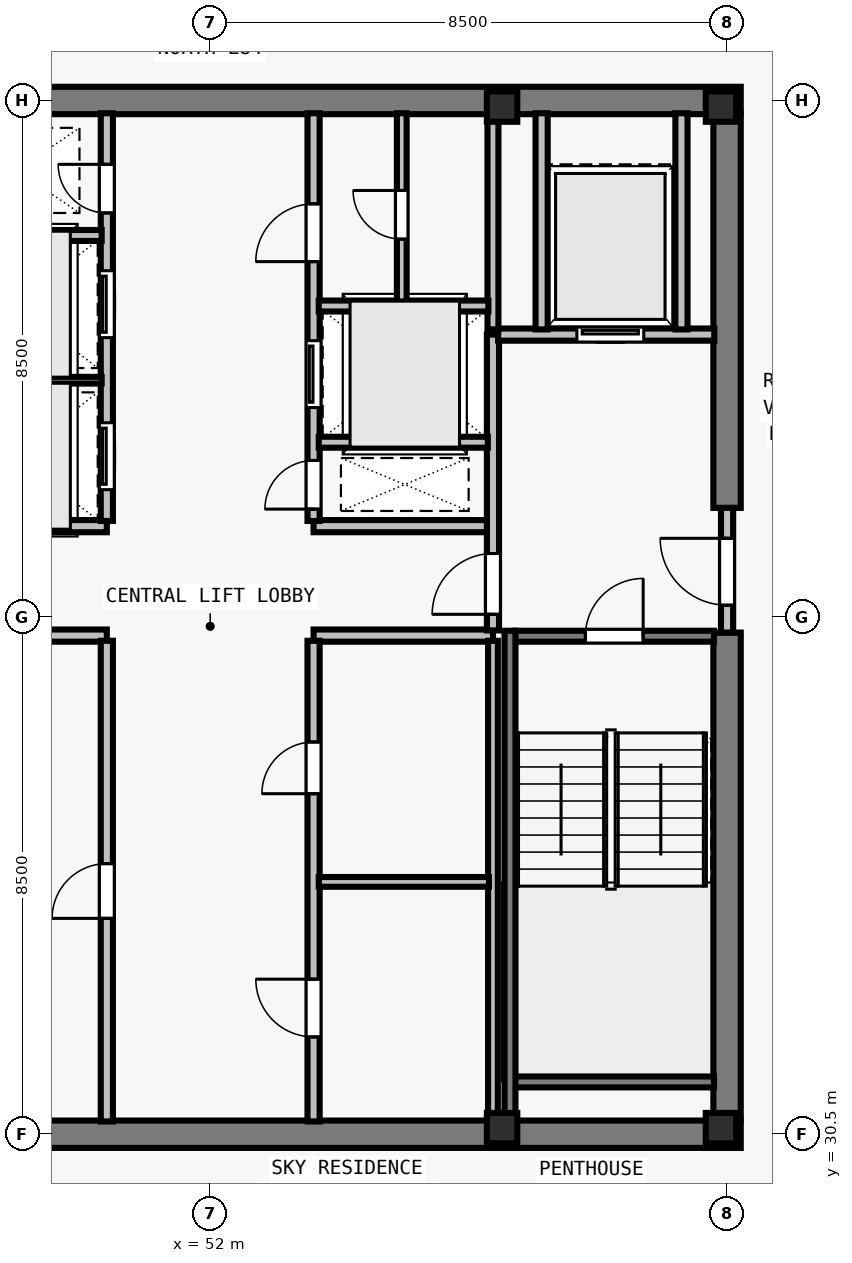
"""IFC4 building model, lengths in metres.
Left out: names, types, materials, properties, quantities, classifications, styles, units other than length and angle.
Written with IfcOpenShell. Run it as: python <this file> out.ifc"""

import sys

from ifc_helpers import new_model, si_unit, direction, frame, frame_2d, origin, origin_2d, place, context, subcontext, project, spatial, rectangle, i_section, extrude, element, fill, save


model = new_model("IFC4")
c1 = context("Model", 3, precision=1e-05, world=origin(), true_north=direction((0.0, 1.0)))
c2 = subcontext(c1, "Body", "Model", "MODEL_VIEW")
j1 = project(units=[si_unit("LENGTHUNIT", "METRE"), si_unit("PLANEANGLEUNIT", "RADIAN")], contexts=[c1])
p1 = place(None, origin())
s1 = spatial("IfcSite", under=j1, at=p1, CompositionType="ELEMENT")
p2 = place(p1, origin())
s2 = spatial("IfcBuilding", under=s1, at=p2, CompositionType="ELEMENT")
p3 = place(p2, frame((0.0, 0.0, 305.0)))
s3 = spatial("IfcBuildingStorey", under=s2, at=p3, CompositionType="ELEMENT", Elevation=305.0)
for number, where, z_axis, x_axis in (
    (1, (56.8, 30.6, 0.0), (0.0, 0.0, 1.0), (1.0, 0.0, 0.0)),
    (2, (60.4, 30.6, 0.0), (0.0, 0.0, 1.0), (1.0, 0.0, 0.0)),
    (3, (56.8, 47.4, 0.0), (0.0, 0.0, 1.0), (1.0, 0.0, 0.0)),
    (4, (60.4, 47.4, 0.0), (0.0, 0.0, 1.0), (1.0, 0.0, 0.0)),
):
    element("IfcColumn", number, at=place(p3, frame(where, z_axis=z_axis, x_axis=x_axis)), inside=s3, PredefinedType="COLUMN", context=c2, shape_type="SweptSolid", body=[
        extrude(i_section(OverallWidth=0.5, OverallDepth=0.5, WebThickness=0.028, FlangeThickness=0.045, at=origin_2d()), origin(), (0.0, 0.0, 1.0), 3.5),
    ])
for number, where, z_axis, x_axis in (
    (5, (43.275, 30.5, 0.0), (0.0, 0.0, 1.0), (1.0, 0.0, 0.0)),
    (6, (43.275, 47.5, 0.0), (0.0, 0.0, 1.0), (1.0, 0.0, 0.0)),
):
    element("IfcWall", number, at=place(p3, frame(where, z_axis=z_axis, x_axis=x_axis)), inside=s3, PredefinedType="SHEAR", context=c2, shape_type="SweptSolid", body=[
        extrude(rectangle(XDim=17.45, YDim=0.45, at=frame_2d((8.725, 0.0))), origin(), (0.0, 0.0, 1.0), 3.29),
    ])
p4 = place(p3, frame((60.5, 30.715, 0.0), z_axis=(0.0, 0.0, 1.0), x_axis=(0.0, 1.0, 0.0)))
e7 = element("IfcWall", 7, at=p4, inside=s3, PredefinedType="SHEAR", context=c2, shape_type="SweptSolid", body=[
    extrude(rectangle(XDim=8.035, YDim=0.45, at=frame_2d((4.018, 0.0))), origin(), (0.0, 0.0, 1.0), 3.29),
])
p5 = place(p3, frame((60.5, 40.8, 0.0), z_axis=(0.0, 0.0, 1.0), x_axis=(0.0, 1.0, 0.0)))
e8 = element("IfcWall", 8, at=p5, inside=s3, PredefinedType="SHEAR", context=c2, shape_type="SweptSolid", body=[
    extrude(rectangle(XDim=6.485, YDim=0.45, at=frame_2d((3.242, 0.0))), origin(), (0.0, 0.0, 1.0), 3.29),
])
for number, where, z_axis, x_axis in (
    (9, (47.35, 38.7, 0.0), (0.0, 0.0, 1.0), (1.0, 0.0, 0.0)),
    (10, (47.35, 40.5, 0.0), (0.0, 0.0, 1.0), (1.0, 0.0, 0.0)),
    (11, (53.7, 38.7, 0.0), (0.0, 0.0, 1.0), (1.0, 0.0, 0.0)),
    (12, (53.7, 40.5, 0.0), (0.0, 0.0, 1.0), (1.0, 0.0, 0.0)),
):
    element("IfcWall", number, at=place(p3, frame(where, z_axis=z_axis, x_axis=x_axis)), inside=s3, PredefinedType="SOLIDWALL", context=c2, shape_type="SweptSolid", body=[
        extrude(rectangle(XDim=2.95, YDim=0.2, at=frame_2d((1.475, 0.0))), origin(), (0.0, 0.0, 1.0), 3.29),
    ])
p6 = place(p3, frame((50.3, 30.71, 0.0), z_axis=(0.0, 0.0, 1.0), x_axis=(0.0, 1.0, 0.0)))
e13 = element("IfcWall", 13, at=p6, inside=s3, PredefinedType="SOLIDWALL", context=c2, shape_type="SweptSolid", body=[
    extrude(rectangle(XDim=7.905, YDim=0.2, at=frame_2d((3.953, 0.0))), origin(), (0.0, 0.0, 1.0), 3.29),
])
p7 = place(p6, frame((3.34, 0.0, 0.0)))
e14 = element("IfcOpeningElement", 14, at=p7, cuts=e13, PredefinedType="OPENING", context=c2, shape_type="SweptSolid", body=[
    extrude(rectangle(XDim=0.9, YDim=2.12, at=frame_2d((0.45, 1.06))), frame((0.0, 0.11, 0.0), z_axis=(0.0, -1.0, 0.0), x_axis=(1.0, 0.0, 0.0)), (0.0, 0.0, 1.0), 0.22),
])
p8 = place(p3, frame((53.7, 30.71, 0.0), z_axis=(0.0, 0.0, 1.0), x_axis=(0.0, 1.0, 0.0)))
e15 = element("IfcWall", 15, at=p8, inside=s3, PredefinedType="SOLIDWALL", context=c2, shape_type="SweptSolid", body=[
    extrude(rectangle(XDim=7.905, YDim=0.2, at=frame_2d((3.953, 0.0))), origin(), (0.0, 0.0, 1.0), 3.29),
])
p9 = place(p8, frame((1.39, 0.0, 0.0)))
e16 = element("IfcOpeningElement", 16, at=p9, cuts=e15, PredefinedType="OPENING", context=c2, shape_type="SweptSolid", body=[
    extrude(rectangle(XDim=0.95, YDim=2.12, at=frame_2d((0.475, 1.06))), frame((0.0, 0.11, 0.0), z_axis=(0.0, -1.0, 0.0), x_axis=(1.0, 0.0, 0.0)), (0.0, 0.0, 1.0), 0.22),
])
p10 = place(p8, frame((5.39, 0.0, 0.0)))
e17 = element("IfcOpeningElement", 17, at=p10, cuts=e15, PredefinedType="OPENING", context=c2, shape_type="SweptSolid", body=[
    extrude(rectangle(XDim=0.85, YDim=2.12, at=frame_2d((0.425, 1.06))), frame((0.0, 0.11, 0.0), z_axis=(0.0, -1.0, 0.0), x_axis=(1.0, 0.0, 0.0)), (0.0, 0.0, 1.0), 0.22),
])
p11 = place(p3, frame((50.3, 40.585, 0.0), z_axis=(0.0, 0.0, 1.0), x_axis=(0.0, 1.0, 0.0)))
e18 = element("IfcWall", 18, at=p11, inside=s3, PredefinedType="SOLIDWALL", context=c2, shape_type="SweptSolid", body=[
    extrude(rectangle(XDim=6.705, YDim=0.2, at=frame_2d((3.353, 0.0))), origin(), (0.0, 0.0, 1.0), 3.29),
])
p12 = place(p11, frame((0.515, 0.0, 0.0)))
e19 = element("IfcOpeningElement", 19, at=p12, cuts=e18, PredefinedType="OPENING", context=c2, shape_type="SweptSolid", body=[
    extrude(rectangle(XDim=1.1, YDim=2.2, at=frame_2d((0.55, 1.1))), frame((0.0, 0.11, 0.0), z_axis=(0.0, -1.0, 0.0), x_axis=(1.0, 0.0, 0.0)), (0.0, 0.0, 1.0), 0.22),
])
p13 = place(p11, frame((3.015, 0.0, 0.0)))
e20 = element("IfcOpeningElement", 20, at=p13, cuts=e18, PredefinedType="OPENING", context=c2, shape_type="SweptSolid", body=[
    extrude(rectangle(XDim=1.1, YDim=2.2, at=frame_2d((0.55, 1.1))), frame((0.0, 0.11, 0.0), z_axis=(0.0, -1.0, 0.0), x_axis=(1.0, 0.0, 0.0)), (0.0, 0.0, 1.0), 0.22),
])
p14 = place(p11, frame((5.065, 0.0, 0.0)))
e21 = element("IfcOpeningElement", 21, at=p14, cuts=e18, PredefinedType="OPENING", context=c2, shape_type="SweptSolid", body=[
    extrude(rectangle(XDim=0.8, YDim=2.08, at=frame_2d((0.4, 1.04))), frame((0.0, 0.11, 0.0), z_axis=(0.0, -1.0, 0.0), x_axis=(1.0, 0.0, 0.0)), (0.0, 0.0, 1.0), 0.22),
])
p15 = place(p3, frame((53.7, 40.585, 0.0), z_axis=(0.0, 0.0, 1.0), x_axis=(0.0, 1.0, 0.0)))
e22 = element("IfcWall", 22, at=p15, inside=s3, PredefinedType="SOLIDWALL", context=c2, shape_type="SweptSolid", body=[
    extrude(rectangle(XDim=6.705, YDim=0.2, at=frame_2d((3.353, 0.0))), origin(), (0.0, 0.0, 1.0), 3.29),
])
p16 = place(p15, frame((0.195, 0.0, 0.0)))
e23 = element("IfcOpeningElement", 23, at=p16, cuts=e22, PredefinedType="OPENING", context=c2, shape_type="SweptSolid", body=[
    extrude(rectangle(XDim=0.8, YDim=2.08, at=frame_2d((0.4, 1.04))), frame((0.0, 0.11, 0.0), z_axis=(0.0, -1.0, 0.0), x_axis=(1.0, 0.0, 0.0)), (0.0, 0.0, 1.0), 0.22),
])
p17 = place(p15, frame((1.865, 0.0, 0.0)))
e24 = element("IfcOpeningElement", 24, at=p17, cuts=e22, PredefinedType="OPENING", context=c2, shape_type="SweptSolid", body=[
    extrude(rectangle(XDim=1.1, YDim=2.2, at=frame_2d((0.55, 1.1))), frame((0.0, 0.11, 0.0), z_axis=(0.0, -1.0, 0.0), x_axis=(1.0, 0.0, 0.0)), (0.0, 0.0, 1.0), 0.22),
])
p18 = place(p15, frame((4.265, 0.0, 0.0)))
e25 = element("IfcOpeningElement", 25, at=p18, cuts=e22, PredefinedType="OPENING", context=c2, shape_type="SweptSolid", body=[
    extrude(rectangle(XDim=0.95, YDim=2.12, at=frame_2d((0.475, 1.06))), frame((0.0, 0.11, 0.0), z_axis=(0.0, -1.0, 0.0), x_axis=(1.0, 0.0, 0.0)), (0.0, 0.0, 1.0), 0.22),
])
p19 = place(p3, frame((60.5, 38.75, 0.0), z_axis=(0.0, 0.0, 1.0), x_axis=(0.0, 1.0, 0.0)))
e26 = element("IfcWall", 26, at=p19, inside=s3, PredefinedType="SOLIDWALL", context=c2, shape_type="SweptSolid", body=[
    extrude(rectangle(XDim=2.05, YDim=0.2, at=frame_2d((1.025, 0.0))), origin(), (0.0, 0.0, 1.0), 3.29),
])
p20 = place(p19, frame((0.45, 0.0, 0.0)))
e27 = element("IfcOpeningElement", 27, at=p20, cuts=e26, PredefinedType="OPENING", context=c2, shape_type="SweptSolid", body=[
    extrude(rectangle(XDim=1.1, YDim=2.15, at=frame_2d((0.55, 1.075))), frame((0.0, 0.11, 0.0), z_axis=(0.0, -1.0, 0.0), x_axis=(1.0, 0.0, 0.0)), (0.0, 0.0, 1.0), 0.22),
])
p21 = place(p3, frame((56.65, 38.785, 0.0), z_axis=(0.0, 0.0, 1.0), x_axis=(0.0, 1.0, 0.0)))
e28 = element("IfcWall", 28, at=p21, inside=s3, PredefinedType="SOLIDWALL", context=c2, shape_type="SweptSolid", body=[
    extrude(rectangle(XDim=4.865, YDim=0.2, at=frame_2d((2.433, 0.0))), origin(), (0.0, 0.0, 1.0), 3.29),
])
p22 = place(p21, frame((0.265, 0.0, 0.0)))
e29 = element("IfcOpeningElement", 29, at=p22, cuts=e28, PredefinedType="OPENING", context=c2, shape_type="SweptSolid", body=[
    extrude(rectangle(XDim=1.0, YDim=2.15, at=frame_2d((0.5, 1.075))), frame((0.0, 0.11, 0.0), z_axis=(0.0, -1.0, 0.0), x_axis=(1.0, 0.0, 0.0)), (0.0, 0.0, 1.0), 0.22),
])
p23 = place(p3, frame((56.735, 43.65, 0.0), z_axis=(0.0, 0.0, 1.0), x_axis=(1.0, 0.0, 0.0)))
e30 = element("IfcWall", 30, at=p23, inside=s3, PredefinedType="SOLIDWALL", context=c2, shape_type="SweptSolid", body=[
    extrude(rectangle(XDim=3.555, YDim=0.2, at=frame_2d((1.777, 0.0))), origin(), (0.0, 0.0, 1.0), 3.29),
])
p24 = place(p23, frame((1.295, 0.0, 0.0)))
e31 = element("IfcOpeningElement", 31, at=p24, cuts=e30, PredefinedType="OPENING", context=c2, shape_type="SweptSolid", body=[
    extrude(rectangle(XDim=1.1, YDim=2.2, at=frame_2d((0.55, 1.1))), frame((0.0, 0.11, 0.0), z_axis=(0.0, -1.0, 0.0), x_axis=(1.0, 0.0, 0.0)), (0.0, 0.0, 1.0), 0.22),
])
for number, where, z_axis, x_axis in (
    (32, (57.45, 43.735, 0.0), (0.0, 0.0, 1.0), (0.0, 1.0, 0.0)),
    (33, (59.75, 43.735, 0.0), (0.0, 0.0, 1.0), (0.0, 1.0, 0.0)),
):
    element("IfcWall", number, at=place(p3, frame(where, z_axis=z_axis, x_axis=x_axis)), inside=s3, PredefinedType="SOLIDWALL", context=c2, shape_type="SweptSolid", body=[
        extrude(rectangle(XDim=3.555, YDim=0.2, at=frame_2d((1.777, 0.0))), origin(), (0.0, 0.0, 1.0), 3.29),
    ])
p25 = place(p3, frame((56.65, 30.71, 0.0), z_axis=(0.0, 0.0, 1.0), x_axis=(0.0, 1.0, 0.0)))
e34 = element("IfcWall", 34, at=p25, inside=s3, PredefinedType="PARTITIONING", context=c2, shape_type="SweptSolid", body=[
    extrude(rectangle(XDim=7.905, YDim=0.16, at=frame_2d((3.953, 0.0))), origin(), (0.0, 0.0, 1.0), 3.29),
])
p26 = place(p3, frame((53.785, 34.65, 0.0), z_axis=(0.0, 0.0, 1.0), x_axis=(1.0, 0.0, 0.0)))
e35 = element("IfcWall", 35, at=p26, inside=s3, PredefinedType="PARTITIONING", context=c2, shape_type="SweptSolid", body=[
    extrude(rectangle(XDim=2.8, YDim=0.16, at=frame_2d((1.4, 0.0))), origin(), (0.0, 0.0, 1.0), 3.29),
])
p27 = place(p3, frame((47.435, 42.9, 0.0), z_axis=(0.0, 0.0, 1.0), x_axis=(1.0, 0.0, 0.0)))
e36 = element("IfcWall", 36, at=p27, inside=s3, PredefinedType="PARTITIONING", context=c2, shape_type="SweptSolid", body=[
    extrude(rectangle(XDim=2.78, YDim=0.11, at=frame_2d((1.39, 0.0))), origin(), (0.0, 0.0, 1.0), 3.29),
])
p28 = place(p3, frame((47.425, 45.28, 0.0), z_axis=(0.0, 0.0, 1.0), x_axis=(1.0, 0.0, 0.0)))
e37 = element("IfcWall", 37, at=p28, inside=s3, PredefinedType="SOLIDWALL", context=c2, shape_type="SweptSolid", body=[
    extrude(rectangle(XDim=2.79, YDim=0.18, at=frame_2d((1.395, 0.0))), origin(), (0.0, 0.0, 1.0), 3.29),
])
p29 = place(p3, frame((56.65, 43.735, 0.0), z_axis=(0.0, 0.0, 1.0), x_axis=(0.0, 1.0, 0.0)))
e38 = element("IfcWall", 38, at=p29, inside=s3, PredefinedType="SOLIDWALL", context=c2, shape_type="SweptSolid", body=[
    extrude(rectangle(XDim=3.555, YDim=0.18, at=frame_2d((1.777, 0.0))), origin(), (0.0, 0.0, 1.0), 3.29),
])
p30 = place(p3, frame((53.785, 41.88, 0.0), z_axis=(0.0, 0.0, 1.0), x_axis=(1.0, 0.0, 0.0)))
e39 = element("IfcWall", 39, at=p30, inside=s3, PredefinedType="SOLIDWALL", context=c2, shape_type="SweptSolid", body=[
    extrude(rectangle(XDim=2.78, YDim=0.18, at=frame_2d((1.39, 0.0))), origin(), (0.0, 0.0, 1.0), 3.29),
])
p31 = place(p3, frame((53.785, 44.12, 0.0), z_axis=(0.0, 0.0, 1.0), x_axis=(1.0, 0.0, 0.0)))
e40 = element("IfcWall", 40, at=p31, inside=s3, PredefinedType="SOLIDWALL", context=c2, shape_type="SweptSolid", body=[
    extrude(rectangle(XDim=2.79, YDim=0.18, at=frame_2d((1.395, 0.0))), origin(), (0.0, 0.0, 1.0), 3.29),
])
p32 = place(p3, frame((55.15, 44.195, 0.0), z_axis=(0.0, 0.0, 1.0), x_axis=(0.0, 1.0, 0.0)))
e41 = element("IfcWall", 41, at=p32, inside=s3, PredefinedType="PARTITIONING", context=c2, shape_type="SweptSolid", body=[
    extrude(rectangle(XDim=3.095, YDim=0.16, at=frame_2d((1.547, 0.0))), origin(), (0.0, 0.0, 1.0), 3.29),
])
p33 = place(p32, frame((1.025, 0.0, 0.0)))
e42 = element("IfcOpeningElement", 42, at=p33, cuts=e41, PredefinedType="OPENING", context=c2, shape_type="SweptSolid", body=[
    extrude(rectangle(XDim=0.8, YDim=2.1, at=frame_2d((0.4, 1.05))), frame((0.0, 0.09, 0.0), z_axis=(0.0, -1.0, 0.0), x_axis=(1.0, 0.0, 0.0)), (0.0, 0.0, 1.0), 0.18),
])
p34 = place(p3, frame((57.005, 38.69, 0.0), z_axis=(0.0, 0.0, 1.0), x_axis=(1.0, 0.0, 0.0)))
e43 = element("IfcWall", 43, at=p34, inside=s3, PredefinedType="SOLIDWALL", context=c2, shape_type="SweptSolid", body=[
    extrude(rectangle(XDim=3.28, YDim=0.18, at=frame_2d((1.64, 0.0))), origin(), (0.0, 0.0, 1.0), 3.29),
])
p35 = place(p34, frame((1.165, 0.0, 0.0)))
e44 = element("IfcOpeningElement", 44, at=p35, cuts=e43, PredefinedType="OPENING", context=c2, shape_type="SweptSolid", body=[
    extrude(rectangle(XDim=0.95, YDim=2.15, at=frame_2d((0.475, 1.075))), frame((0.0, 0.1, 0.0), z_axis=(0.0, -1.0, 0.0), x_axis=(1.0, 0.0, 0.0)), (0.0, 0.0, 1.0), 0.2),
])
p36 = place(p3, frame((57.005, 31.36, 0.0), z_axis=(0.0, 0.0, 1.0), x_axis=(1.0, 0.0, 0.0)))
e45 = element("IfcWall", 45, at=p36, inside=s3, PredefinedType="SOLIDWALL", context=c2, shape_type="SweptSolid", body=[
    extrude(rectangle(XDim=3.28, YDim=0.18, at=frame_2d((1.64, 0.0))), origin(), (0.0, 0.0, 1.0), 3.29),
])
p37 = place(p3, frame((56.93, 38.78, 0.0), z_axis=(0.0, 0.0, 1.0), x_axis=(0.0, -1.0, 0.0)))
e46 = element("IfcWall", 46, at=p37, inside=s3, PredefinedType="SOLIDWALL", context=c2, shape_type="SweptSolid", body=[
    extrude(rectangle(XDim=8.067, YDim=0.18, at=frame_2d((4.034, 0.0))), origin(), (0.0, 0.0, 1.0), 3.29),
])
p38 = place(p20, origin())
e47 = element("IfcDoor", 47, at=p38, inside=s3, OperationType="SINGLE_SWING_RIGHT", PredefinedType="DOOR", context=c2, shape_type="SweptSolid", body=[
    extrude(rectangle(XDim=1.1, YDim=2.15, at=frame_2d((0.55, 1.075))), frame((0.0, 0.025, 0.0), z_axis=(0.0, -1.0, 0.0), x_axis=(1.0, 0.0, 0.0)), (0.0, 0.0, 1.0), 0.05),
])
fill(e27, e47)
p39 = place(p22, origin())
e48 = element("IfcDoor", 48, at=p39, inside=s3, OperationType="SINGLE_SWING_LEFT", PredefinedType="DOOR", context=c2, shape_type="SweptSolid", body=[
    extrude(rectangle(XDim=1.0, YDim=2.15, at=frame_2d((0.5, 1.075))), frame((0.0, 0.025, 0.0), z_axis=(0.0, -1.0, 0.0), x_axis=(1.0, 0.0, 0.0)), (0.0, 0.0, 1.0), 0.05),
])
fill(e29, e48)
p40 = place(p24, origin())
e49 = element("IfcDoor", 49, at=p40, inside=s3, OperationType="SLIDING_TO_LEFT", PredefinedType="DOOR", context=c2, shape_type="SweptSolid", body=[
    extrude(rectangle(XDim=1.1, YDim=2.2, at=frame_2d((0.55, 1.1))), frame((0.0, 0.025, 0.0), z_axis=(0.0, -1.0, 0.0), x_axis=(1.0, 0.0, 0.0)), (0.0, 0.0, 1.0), 0.05),
])
fill(e31, e49)
p41 = place(p7, origin())
e50 = element("IfcDoor", 50, at=p41, inside=s3, OperationType="SINGLE_SWING_LEFT", PredefinedType="DOOR", context=c2, shape_type="SweptSolid", body=[
    extrude(rectangle(XDim=0.9, YDim=2.12, at=frame_2d((0.45, 1.06))), frame((0.0, 0.025, 0.0), z_axis=(0.0, -1.0, 0.0), x_axis=(1.0, 0.0, 0.0)), (0.0, 0.0, 1.0), 0.05),
])
fill(e14, e50)
p42 = place(p9, origin())
e51 = element("IfcDoor", 51, at=p42, inside=s3, OperationType="SINGLE_SWING_RIGHT", PredefinedType="DOOR", context=c2, shape_type="SweptSolid", body=[
    extrude(rectangle(XDim=0.95, YDim=2.12, at=frame_2d((0.475, 1.06))), frame((0.0, 0.025, 0.0), z_axis=(0.0, -1.0, 0.0), x_axis=(1.0, 0.0, 0.0)), (0.0, 0.0, 1.0), 0.05),
])
fill(e16, e51)
p43 = place(p10, origin())
e52 = element("IfcDoor", 52, at=p43, inside=s3, OperationType="SINGLE_SWING_LEFT", PredefinedType="DOOR", context=c2, shape_type="SweptSolid", body=[
    extrude(rectangle(XDim=0.85, YDim=2.12, at=frame_2d((0.425, 1.06))), frame((0.0, 0.025, 0.0), z_axis=(0.0, -1.0, 0.0), x_axis=(1.0, 0.0, 0.0)), (0.0, 0.0, 1.0), 0.05),
])
fill(e17, e52)
p44 = place(p12, origin())
e53 = element("IfcDoor", 53, at=p44, inside=s3, OperationType="SLIDING_TO_LEFT", PredefinedType="DOOR", context=c2, shape_type="SweptSolid", body=[
    extrude(rectangle(XDim=1.1, YDim=2.2, at=frame_2d((0.55, 1.1))), frame((0.0, 0.025, 0.0), z_axis=(0.0, -1.0, 0.0), x_axis=(1.0, 0.0, 0.0)), (0.0, 0.0, 1.0), 0.05),
])
fill(e19, e53)
p45 = place(p13, origin())
e54 = element("IfcDoor", 54, at=p45, inside=s3, OperationType="SLIDING_TO_LEFT", PredefinedType="DOOR", context=c2, shape_type="SweptSolid", body=[
    extrude(rectangle(XDim=1.1, YDim=2.2, at=frame_2d((0.55, 1.1))), frame((0.0, 0.025, 0.0), z_axis=(0.0, -1.0, 0.0), x_axis=(1.0, 0.0, 0.0)), (0.0, 0.0, 1.0), 0.05),
])
fill(e20, e54)
p46 = place(p14, origin())
e55 = element("IfcDoor", 55, at=p46, inside=s3, OperationType="SINGLE_SWING_RIGHT", PredefinedType="DOOR", context=c2, shape_type="SweptSolid", body=[
    extrude(rectangle(XDim=0.8, YDim=2.08, at=frame_2d((0.4, 1.04))), frame((0.0, 0.025, 0.0), z_axis=(0.0, -1.0, 0.0), x_axis=(1.0, 0.0, 0.0)), (0.0, 0.0, 1.0), 0.05),
])
fill(e21, e55)
p47 = place(p16, origin())
e56 = element("IfcDoor", 56, at=p47, inside=s3, OperationType="SINGLE_SWING_LEFT", PredefinedType="DOOR", context=c2, shape_type="SweptSolid", body=[
    extrude(rectangle(XDim=0.8, YDim=2.08, at=frame_2d((0.4, 1.04))), frame((0.0, 0.025, 0.0), z_axis=(0.0, -1.0, 0.0), x_axis=(1.0, 0.0, 0.0)), (0.0, 0.0, 1.0), 0.05),
])
fill(e23, e56)
p48 = place(p17, origin())
e57 = element("IfcDoor", 57, at=p48, inside=s3, OperationType="SLIDING_TO_LEFT", PredefinedType="DOOR", context=c2, shape_type="SweptSolid", body=[
    extrude(rectangle(XDim=1.1, YDim=2.2, at=frame_2d((0.55, 1.1))), frame((0.0, 0.025, 0.0), z_axis=(0.0, -1.0, 0.0), x_axis=(1.0, 0.0, 0.0)), (0.0, 0.0, 1.0), 0.05),
])
fill(e24, e57)
p49 = place(p18, origin())
e58 = element("IfcDoor", 58, at=p49, inside=s3, OperationType="SINGLE_SWING_LEFT", PredefinedType="DOOR", context=c2, shape_type="SweptSolid", body=[
    extrude(rectangle(XDim=0.95, YDim=2.12, at=frame_2d((0.475, 1.06))), frame((0.0, 0.025, 0.0), z_axis=(0.0, -1.0, 0.0), x_axis=(1.0, 0.0, 0.0)), (0.0, 0.0, 1.0), 0.05),
])
fill(e25, e58)
p50 = place(p33, origin())
e59 = element("IfcDoor", 59, at=p50, inside=s3, OperationType="SINGLE_SWING_RIGHT", PredefinedType="DOOR", context=c2, shape_type="SweptSolid", body=[
    extrude(rectangle(XDim=0.8, YDim=2.1, at=frame_2d((0.4, 1.05))), frame((0.0, 0.025, 0.0), z_axis=(0.0, -1.0, 0.0), x_axis=(1.0, 0.0, 0.0)), (0.0, 0.0, 1.0), 0.05),
])
fill(e42, e59)
p51 = place(p35, origin())
e60 = element("IfcDoor", 60, at=p51, inside=s3, OperationType="SINGLE_SWING_RIGHT", PredefinedType="DOOR", context=c2, shape_type="SweptSolid", body=[
    extrude(rectangle(XDim=0.95, YDim=2.15, at=frame_2d((0.475, 1.075))), frame((0.0, 0.025, 0.0), z_axis=(0.0, -1.0, 0.0), x_axis=(1.0, 0.0, 0.0)), (0.0, 0.0, 1.0), 0.05),
])
fill(e44, e60)
save(model, sys.argv[1])
